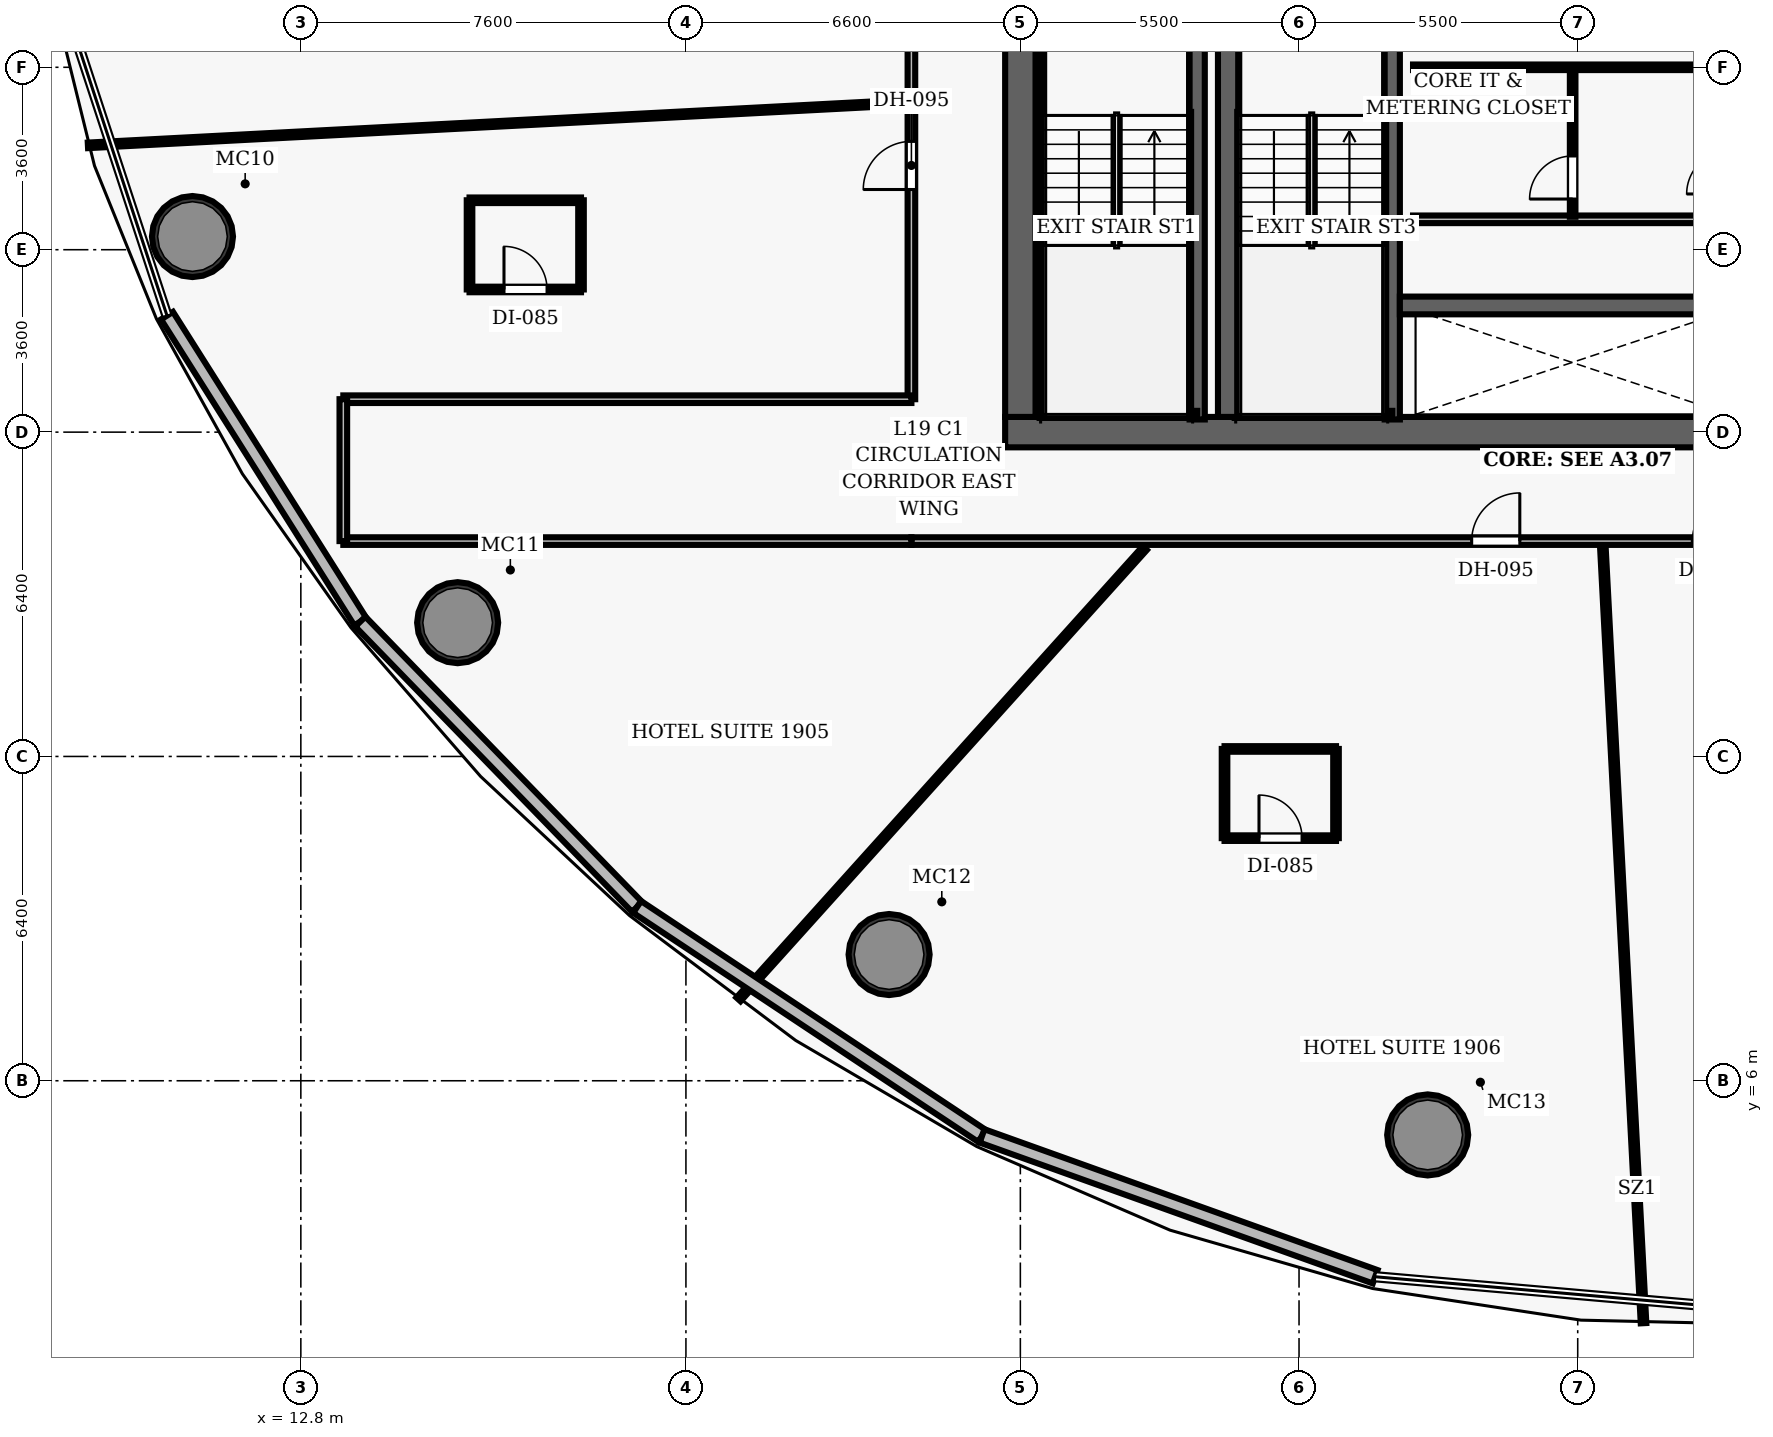
"""IFC4 building model, lengths in metres.
Left out: names, types, materials, properties, quantities, classifications, styles, units other than length and angle.
Written with IfcOpenShell. Run it as: python <this file> out.ifc"""

import sys

from ifc_helpers import new_model, si_unit, direction, frame, frame_2d, origin, origin_2d, place, context, subcontext, project, spatial, rectangle, hollow_circle, extrude, element, fill, save


model = new_model("IFC4")
c1 = context("Model", 3, precision=1e-05, world=origin(), true_north=direction((0.0, 1.0)))
c2 = subcontext(c1, "Body", "Model", "MODEL_VIEW")
j1 = project(units=[si_unit("LENGTHUNIT", "METRE"), si_unit("PLANEANGLEUNIT", "RADIAN")], contexts=[c1])
p1 = place(None, origin())
s1 = spatial("IfcSite", under=j1, at=p1, CompositionType="ELEMENT")
p2 = place(p1, origin())
s2 = spatial("IfcBuilding", under=s1, at=p2, CompositionType="ELEMENT")
p3 = place(p2, frame((0.0, 0.0, 83.4)))
s3 = spatial("IfcBuildingStorey", under=s2, at=p3, CompositionType="ELEMENT", Elevation=83.4)
p4 = place(p3, frame((26.7, 18.8, 0.0), z_axis=(0.0, 0.0, 1.0), x_axis=(1.0, 0.0, 0.0)))
e1 = element("IfcWall", 1, at=p4, inside=s3, PredefinedType="SHEAR", context=c2, shape_type="SweptSolid", body=[
    extrude(rectangle(XDim=22.6, YDim=0.6, at=frame_2d((11.3, 0.0))), origin(), (0.0, 0.0, 1.0), 3.5),
])
p5 = place(p4, frame((14.52, 0.0, 0.0)))
e2 = element("IfcOpeningElement", 2, at=p5, cuts=e1, PredefinedType="OPENING", context=c2, shape_type="SweptSolid", body=[
    extrude(rectangle(XDim=1.05, YDim=2.15, at=frame_2d((0.525, 1.075))), frame((0.0, 0.31, 0.0), z_axis=(0.0, -1.0, 0.0), x_axis=(1.0, 0.0, 0.0)), (0.0, 0.0, 1.0), 0.62),
])
p6 = place(p3, frame((27.0, 19.1, 0.0), z_axis=(0.0, 0.0, 1.0), x_axis=(0.0, 1.0, 0.0)))
e3 = element("IfcWall", 3, at=p6, inside=s3, PredefinedType="SHEAR", context=c2, shape_type="SweptSolid", body=[
    extrude(rectangle(XDim=13.8, YDim=0.6, at=frame_2d((6.9, 0.0))), origin(), (0.0, 0.0, 1.0), 3.5),
])
p7 = place(p6, frame((8.2, 0.0, 0.0)))
e4 = element("IfcOpeningElement", 4, at=p7, cuts=e3, PredefinedType="OPENING", context=c2, shape_type="SweptSolid", body=[
    extrude(rectangle(XDim=1.05, YDim=2.15, at=frame_2d((0.525, 1.075))), frame((0.0, 0.31, 0.0), z_axis=(0.0, -1.0, 0.0), x_axis=(1.0, 0.0, 0.0)), (0.0, 0.0, 1.0), 0.62),
])
p8 = place(p3, frame((31.1, 19.1, 0.0), z_axis=(0.0, 0.0, 1.0), x_axis=(0.0, 1.0, 0.0)))
e5 = element("IfcWall", 5, at=p8, inside=s3, PredefinedType="SHEAR", context=c2, shape_type="SweptSolid", body=[
    extrude(rectangle(XDim=13.8, YDim=0.4, at=frame_2d((6.9, 0.0))), origin(), (0.0, 0.0, 1.0), 3.5),
])
for number, where, z_axis, x_axis in (
    (6, (10.661, 22.66, 0.0), (0.0, 0.0, 1.0), (1.0, 0.0, 0.0)),
    (7, (15.895, 15.04, 0.0), (0.0, 0.0, 1.0), (1.0, 0.0, 0.0)),
    (8, (24.41, 8.491, 0.0), (0.0, 0.0, 1.0), (1.0, 0.0, 0.0)),
    (9, (35.039, 4.931, 0.0), (0.0, 0.0, 1.0), (1.0, 0.0, 0.0)),
):
    element("IfcColumn", number, at=place(p3, frame(where, z_axis=z_axis, x_axis=x_axis)), inside=s3, PredefinedType="COLUMN", context=c2, shape_type="SweptSolid", body=[
        extrude(hollow_circle(Radius=0.8, WallThickness=0.06, at=origin_2d()), origin(), (0.0, 0.0, 1.0), 3.5),
    ])
p9 = place(p3, frame((30.49, 19.05, 0.0), z_axis=(0.0, 0.0, 1.0), x_axis=(0.0, 1.0, 0.0)))
e10 = element("IfcWall", 10, at=p9, inside=s3, PredefinedType="SHEAR", context=c2, shape_type="SweptSolid", body=[
    extrude(rectangle(XDim=7.5, YDim=0.3, at=frame_2d((3.75, 0.0))), origin(), (0.0, 0.0, 1.0), 3.5),
])
p10 = place(p3, frame((27.395, 19.1, 0.0), z_axis=(0.0, 0.0, 1.0), x_axis=(0.0, 1.0, 0.0)))
e11 = element("IfcWall", 11, at=p10, inside=s3, PredefinedType="SHEAR", context=c2, shape_type="SweptSolid", body=[
    extrude(rectangle(XDim=7.45, YDim=0.12, at=frame_2d((3.725, 0.0))), origin(), (0.0, 0.0, 1.0), 3.5),
])
p11 = place(p3, frame((27.395, 19.16, 0.0), z_axis=(0.0, 0.0, 1.0), x_axis=(1.0, 0.0, 0.0)))
e12 = element("IfcWall", 12, at=p11, inside=s3, PredefinedType="SHEAR", context=c2, shape_type="SweptSolid", body=[
    extrude(rectangle(XDim=3.095, YDim=0.12, at=frame_2d((1.547, 0.0))), origin(), (0.0, 0.0, 1.0), 3.5),
])
p12 = place(p3, frame((34.34, 19.05, 0.0), z_axis=(0.0, 0.0, 1.0), x_axis=(0.0, 1.0, 0.0)))
e13 = element("IfcWall", 13, at=p12, inside=s3, PredefinedType="SHEAR", context=c2, shape_type="SweptSolid", body=[
    extrude(rectangle(XDim=7.5, YDim=0.3, at=frame_2d((3.75, 0.0))), origin(), (0.0, 0.0, 1.0), 3.5),
])
p13 = place(p3, frame((31.3, 19.16, 0.0), z_axis=(0.0, 0.0, 1.0), x_axis=(1.0, 0.0, 0.0)))
e14 = element("IfcWall", 14, at=p13, inside=s3, PredefinedType="SHEAR", context=c2, shape_type="SweptSolid", body=[
    extrude(rectangle(XDim=3.04, YDim=0.12, at=frame_2d((1.52, 0.0))), origin(), (0.0, 0.0, 1.0), 3.5),
])
p14 = place(p3, frame((34.49, 21.3, 0.0), z_axis=(0.0, 0.0, 1.0), x_axis=(1.0, 0.0, 0.0)))
e15 = element("IfcWall", 15, at=p14, inside=s3, PredefinedType="SHEAR", context=c2, shape_type="SweptSolid", body=[
    extrude(rectangle(XDim=6.68, YDim=0.35, at=frame_2d((3.34, 0.0))), origin(), (0.0, 0.0, 1.0), 2.6),
])
p15 = place(p3, frame((34.75, 23.0, 0.0), z_axis=(0.0, 0.0, 1.0), x_axis=(1.0, 0.0, 0.0)))
e16 = element("IfcWall", 16, at=p15, inside=s3, PredefinedType="PARTITIONING", context=c2, shape_type="SweptSolid", body=[
    extrude(rectangle(XDim=6.25, YDim=0.15, at=frame_2d((3.125, 0.0))), origin(), (0.0, 0.0, 1.0), 2.6),
])
p16 = place(p3, frame((34.75, 26.0, 0.0), z_axis=(0.0, 0.0, 1.0), x_axis=(1.0, 0.0, 0.0)))
e17 = element("IfcWall", 17, at=p16, inside=s3, PredefinedType="PARTITIONING", context=c2, shape_type="SweptSolid", body=[
    extrude(rectangle(XDim=6.25, YDim=0.11, at=frame_2d((3.125, 0.0))), origin(), (0.0, 0.0, 1.0), 2.6),
])
p17 = place(p3, frame((37.9, 23.05, 0.0), z_axis=(0.0, 0.0, 1.0), x_axis=(0.0, 1.0, 0.0)))
e18 = element("IfcWall", 18, at=p17, inside=s3, PredefinedType="PARTITIONING", context=c2, shape_type="SweptSolid", body=[
    extrude(rectangle(XDim=2.95, YDim=0.11, at=frame_2d((1.475, 0.0))), origin(), (0.0, 0.0, 1.0), 2.6),
])
p18 = place(p17, frame((0.35, 0.0, 0.0)))
e19 = element("IfcOpeningElement", 19, at=p18, cuts=e18, PredefinedType="OPENING", context=c2, shape_type="SweptSolid", body=[
    extrude(rectangle(XDim=0.85, YDim=2.1, at=frame_2d((0.425, 1.05))), frame((0.0, 0.065, 0.0), z_axis=(0.0, -1.0, 0.0), x_axis=(1.0, 0.0, 0.0)), (0.0, 0.0, 1.0), 0.13),
])
p19 = place(p3, frame((24.85, 16.65, 0.0), z_axis=(0.0, 0.0, 1.0), x_axis=(1.0, 0.0, 0.0)))
e20 = element("IfcWall", 20, at=p19, inside=s3, PredefinedType="PARTITIONING", context=c2, shape_type="SweptSolid", body=[
    extrude(rectangle(XDim=23.5, YDim=0.15, at=frame_2d((11.75, 0.0))), origin(), (0.0, 0.0, 1.0), 2.6),
])
p20 = place(p19, frame((11.057, 0.0, 0.0)))
e21 = element("IfcOpeningElement", 21, at=p20, cuts=e20, PredefinedType="OPENING", context=c2, shape_type="SweptSolid", body=[
    extrude(rectangle(XDim=0.95, YDim=2.15, at=frame_2d((0.475, 1.075))), frame((0.0, 0.085, 0.0), z_axis=(0.0, -1.0, 0.0), x_axis=(1.0, 0.0, 0.0)), (0.0, 0.0, 1.0), 0.17),
])
p21 = place(p19, frame((15.413, 0.0, 0.0)))
e22 = element("IfcOpeningElement", 22, at=p21, cuts=e20, PredefinedType="OPENING", context=c2, shape_type="SweptSolid", body=[
    extrude(rectangle(XDim=0.95, YDim=2.15, at=frame_2d((0.475, 1.075))), frame((0.0, 0.085, 0.0), z_axis=(0.0, -1.0, 0.0), x_axis=(1.0, 0.0, 0.0)), (0.0, 0.0, 1.0), 0.17),
])
p22 = place(p3, frame((24.85, 19.45, 0.0), z_axis=(0.0, 0.0, 1.0), x_axis=(0.0, 1.0, 0.0)))
e23 = element("IfcWall", 23, at=p22, inside=s3, PredefinedType="PARTITIONING", context=c2, shape_type="SweptSolid", body=[
    extrude(rectangle(XDim=15.9, YDim=0.15, at=frame_2d((7.95, 0.0))), origin(), (0.0, 0.0, 1.0), 2.6),
])
p23 = place(p22, frame((7.669, 0.0, 0.0)))
e24 = element("IfcOpeningElement", 24, at=p23, cuts=e23, PredefinedType="OPENING", context=c2, shape_type="SweptSolid", body=[
    extrude(rectangle(XDim=0.95, YDim=2.15, at=frame_2d((0.475, 1.075))), frame((0.0, 0.085, 0.0), z_axis=(0.0, -1.0, 0.0), x_axis=(1.0, 0.0, 0.0)), (0.0, 0.0, 1.0), 0.17),
])
p24 = place(p22, frame((4.138, 0.0, 0.0)))
e25 = element("IfcOpeningElement", 25, at=p24, cuts=e23, PredefinedType="OPENING", context=c2, shape_type="SweptSolid", body=[
    extrude(rectangle(XDim=0.95, YDim=2.15, at=frame_2d((0.475, 1.075))), frame((0.0, 0.085, 0.0), z_axis=(0.0, -1.0, 0.0), x_axis=(1.0, 0.0, 0.0)), (0.0, 0.0, 1.0), 0.17),
])
for number, where, z_axis, x_axis in (
    (26, (13.639, 19.45, 0.0), (0.0, 0.0, 1.0), (1.0, 0.0, 0.0)),
    (27, (13.639, 16.65, 0.0), (0.0, 0.0, 1.0), (1.0, 0.0, 0.0)),
):
    element("IfcWall", number, at=place(p3, frame(where, z_axis=z_axis, x_axis=x_axis)), inside=s3, PredefinedType="PARTITIONING", context=c2, shape_type="SweptSolid", body=[
        extrude(rectangle(XDim=11.211, YDim=0.15, at=frame_2d((5.606, 0.0))), origin(), (0.0, 0.0, 1.0), 2.6),
    ])
p25 = place(p3, frame((13.639, 16.65, 0.0), z_axis=(0.0, 0.0, 1.0), x_axis=(0.0, 1.0, 0.0)))
e28 = element("IfcWall", 28, at=p25, inside=s3, PredefinedType="PARTITIONING", context=c2, shape_type="SweptSolid", body=[
    extrude(rectangle(XDim=2.8, YDim=0.15, at=frame_2d((1.4, 0.0))), origin(), (0.0, 0.0, 1.0), 2.6),
])
p26 = place(p3, frame((24.71, 25.303, 0.0), z_axis=(0.0, 0.0, 1.0), x_axis=(-0.998629300498, -0.052340425941, 0.0)))
e29 = element("IfcWall", 29, at=p26, inside=s3, PredefinedType="PARTITIONING", context=c2, shape_type="SweptSolid", body=[
    extrude(rectangle(XDim=16.135, YDim=0.11, at=frame_2d((8.067, 0.0))), origin(), (0.0, 0.0, 1.0), 2.6),
])
p27 = place(p3, frame((29.455, 16.51, 0.0), z_axis=(0.0, 0.0, 1.0), x_axis=(-0.669127933847, -0.743147231809, 0.0)))
e30 = element("IfcWall", 30, at=p27, inside=s3, PredefinedType="PARTITIONING", context=c2, shape_type="SweptSolid", body=[
    extrude(rectangle(XDim=11.983, YDim=0.11, at=frame_2d((5.991, 0.0))), origin(), (0.0, 0.0, 1.0), 2.6),
])
p28 = place(p3, frame((38.497, 16.51, 0.0), z_axis=(0.0, 0.0, 1.0), x_axis=(0.052333766551, -0.998629649509, 0.0)))
e31 = element("IfcWall", 31, at=p28, inside=s3, PredefinedType="PARTITIONING", context=c2, shape_type="SweptSolid", body=[
    extrude(rectangle(XDim=15.315, YDim=0.11, at=frame_2d((7.658, 0.0))), origin(), (0.0, 0.0, 1.0), 2.6),
])
p29 = place(p3, frame((16.129, 21.615, 0.0), z_axis=(0.0, 0.0, 1.0), x_axis=(1.0, 0.0, 0.0)))
e32 = element("IfcWall", 32, at=p29, inside=s3, PredefinedType="PARTITIONING", context=c2, shape_type="SweptSolid", body=[
    extrude(rectangle(XDim=2.2, YDim=0.11, at=frame_2d((1.1, 0.0))), origin(), (0.0, 0.0, 1.0), 2.6),
])
p30 = place(p29, frame((0.68, 0.0, 0.0)))
e33 = element("IfcOpeningElement", 33, at=p30, cuts=e32, PredefinedType="OPENING", context=c2, shape_type="SweptSolid", body=[
    extrude(rectangle(XDim=0.85, YDim=2.1, at=frame_2d((0.425, 1.05))), frame((0.0, 0.065, 0.0), z_axis=(0.0, -1.0, 0.0), x_axis=(1.0, 0.0, 0.0)), (0.0, 0.0, 1.0), 0.13),
])
p31 = place(p3, frame((16.129, 23.375, 0.0), z_axis=(0.0, 0.0, 1.0), x_axis=(1.0, 0.0, 0.0)))
e34 = element("IfcWall", 34, at=p31, inside=s3, PredefinedType="PARTITIONING", context=c2, shape_type="SweptSolid", body=[
    extrude(rectangle(XDim=2.2, YDim=0.11, at=frame_2d((1.1, 0.0))), origin(), (0.0, 0.0, 1.0), 2.6),
])
for number, where, z_axis, x_axis in (
    (35, (16.129, 21.615, 0.0), (0.0, 0.0, 1.0), (0.0, 1.0, 0.0)),
    (36, (18.329, 21.615, 0.0), (0.0, 0.0, 1.0), (0.0, 1.0, 0.0)),
):
    element("IfcWall", number, at=place(p3, frame(where, z_axis=z_axis, x_axis=x_axis)), inside=s3, PredefinedType="PARTITIONING", context=c2, shape_type="SweptSolid", body=[
        extrude(rectangle(XDim=1.76, YDim=0.11, at=frame_2d((0.88, 0.0))), origin(), (0.0, 0.0, 1.0), 2.6),
    ])
p32 = place(p3, frame((31.03, 10.788, 0.0), z_axis=(0.0, 0.0, 1.0), x_axis=(1.0, 0.0, 0.0)))
e37 = element("IfcWall", 37, at=p32, inside=s3, PredefinedType="PARTITIONING", context=c2, shape_type="SweptSolid", body=[
    extrude(rectangle(XDim=2.2, YDim=0.11, at=frame_2d((1.1, 0.0))), origin(), (0.0, 0.0, 1.0), 2.6),
])
p33 = place(p32, frame((0.68, 0.0, 0.0)))
e38 = element("IfcOpeningElement", 38, at=p33, cuts=e37, PredefinedType="OPENING", context=c2, shape_type="SweptSolid", body=[
    extrude(rectangle(XDim=0.85, YDim=2.1, at=frame_2d((0.425, 1.05))), frame((0.0, 0.065, 0.0), z_axis=(0.0, -1.0, 0.0), x_axis=(1.0, 0.0, 0.0)), (0.0, 0.0, 1.0), 0.13),
])
p34 = place(p3, frame((31.03, 12.548, 0.0), z_axis=(0.0, 0.0, 1.0), x_axis=(1.0, 0.0, 0.0)))
e39 = element("IfcWall", 39, at=p34, inside=s3, PredefinedType="PARTITIONING", context=c2, shape_type="SweptSolid", body=[
    extrude(rectangle(XDim=2.2, YDim=0.11, at=frame_2d((1.1, 0.0))), origin(), (0.0, 0.0, 1.0), 2.6),
])
for number, where, z_axis, x_axis in (
    (40, (31.03, 10.788, 0.0), (0.0, 0.0, 1.0), (0.0, 1.0, 0.0)),
    (41, (33.23, 10.788, 0.0), (0.0, 0.0, 1.0), (0.0, 1.0, 0.0)),
):
    element("IfcWall", number, at=place(p3, frame(where, z_axis=z_axis, x_axis=x_axis)), inside=s3, PredefinedType="PARTITIONING", context=c2, shape_type="SweptSolid", body=[
        extrude(rectangle(XDim=1.76, YDim=0.11, at=frame_2d((0.88, 0.0))), origin(), (0.0, 0.0, 1.0), 2.6),
    ])
p35 = place(p3, frame((13.974, 15.061, 0.0), z_axis=(0.0, 0.0, 1.0), x_axis=(-0.534152439674, 0.845388177815, 0.0)))
e42 = element("IfcWall", 42, at=p35, inside=s3, PredefinedType="SOLIDWALL", context=c2, shape_type="SweptSolid", body=[
    extrude(rectangle(XDim=7.143, YDim=0.28, at=frame_2d((3.572, 0.0))), origin(), (0.0, 0.0, 1.0), 3.25),
])
p36 = place(p3, frame((19.436, 9.43, 0.0), z_axis=(0.0, 0.0, 1.0), x_axis=(-0.696319820972, 0.717731639906, 0.0)))
e43 = element("IfcWall", 43, at=p36, inside=s3, PredefinedType="SOLIDWALL", context=c2, shape_type="SweptSolid", body=[
    extrude(rectangle(XDim=7.845, YDim=0.28, at=frame_2d((3.922, 0.0))), origin(), (0.0, 0.0, 1.0), 3.25),
])
p37 = place(p3, frame((26.244, 4.911, 0.0), z_axis=(0.0, 0.0, 1.0), x_axis=(-0.833156470186, 0.553037337064, 0.0)))
e44 = element("IfcWall", 44, at=p37, inside=s3, PredefinedType="SOLIDWALL", context=c2, shape_type="SweptSolid", body=[
    extrude(rectangle(XDim=8.171, YDim=0.28, at=frame_2d((4.085, 0.0))), origin(), (0.0, 0.0, 1.0), 3.25),
])
p38 = place(p3, frame((34.003, 2.132, 0.0), z_axis=(0.0, 0.0, 1.0), x_axis=(-0.941431874185, 0.337203241782, 0.0)))
e45 = element("IfcWall", 45, at=p38, inside=s3, PredefinedType="SOLIDWALL", context=c2, shape_type="SweptSolid", body=[
    extrude(rectangle(XDim=8.241, YDim=0.28, at=frame_2d((4.121, 0.0))), origin(), (0.0, 0.0, 1.0), 3.25),
])
p39 = place(p18, origin())
e46 = element("IfcDoor", 46, at=p39, inside=s3, OperationType="SINGLE_SWING_LEFT", PredefinedType="DOOR", context=c2, shape_type="SweptSolid", body=[
    extrude(rectangle(XDim=0.85, YDim=2.1, at=frame_2d((0.425, 1.05))), frame((0.0, 0.025, 0.0), z_axis=(0.0, -1.0, 0.0), x_axis=(1.0, 0.0, 0.0)), (0.0, 0.0, 1.0), 0.05),
])
fill(e19, e46)
p40 = place(p24, origin())
e47 = element("IfcDoor", 47, at=p40, inside=s3, OperationType="SINGLE_SWING_LEFT", PredefinedType="DOOR", context=c2, shape_type="SweptSolid", body=[
    extrude(rectangle(XDim=0.95, YDim=2.15, at=frame_2d((0.475, 1.075))), frame((0.0, 0.025, 0.0), z_axis=(0.0, -1.0, 0.0), x_axis=(1.0, 0.0, 0.0)), (0.0, 0.0, 1.0), 0.05),
])
fill(e25, e47)
p41 = place(p30, origin())
e48 = element("IfcDoor", 48, at=p41, inside=s3, OperationType="SINGLE_SWING_LEFT", PredefinedType="DOOR", context=c2, shape_type="SweptSolid", body=[
    extrude(rectangle(XDim=0.85, YDim=2.1, at=frame_2d((0.425, 1.05))), frame((0.0, 0.025, 0.0), z_axis=(0.0, -1.0, 0.0), x_axis=(1.0, 0.0, 0.0)), (0.0, 0.0, 1.0), 0.05),
])
fill(e33, e48)
p42 = place(p20, origin())
e49 = element("IfcDoor", 49, at=p42, inside=s3, OperationType="SINGLE_SWING_RIGHT", PredefinedType="DOOR", context=c2, shape_type="SweptSolid", body=[
    extrude(rectangle(XDim=0.95, YDim=2.15, at=frame_2d((0.475, 1.075))), frame((0.0, 0.025, 0.0), z_axis=(0.0, -1.0, 0.0), x_axis=(1.0, 0.0, 0.0)), (0.0, 0.0, 1.0), 0.05),
])
fill(e21, e49)
p43 = place(p33, origin())
e50 = element("IfcDoor", 50, at=p43, inside=s3, OperationType="SINGLE_SWING_LEFT", PredefinedType="DOOR", context=c2, shape_type="SweptSolid", body=[
    extrude(rectangle(XDim=0.85, YDim=2.1, at=frame_2d((0.425, 1.05))), frame((0.0, 0.025, 0.0), z_axis=(0.0, -1.0, 0.0), x_axis=(1.0, 0.0, 0.0)), (0.0, 0.0, 1.0), 0.05),
])
fill(e38, e50)
p44 = place(p21, origin())
e51 = element("IfcDoor", 51, at=p44, inside=s3, OperationType="SINGLE_SWING_RIGHT", PredefinedType="DOOR", context=c2, shape_type="SweptSolid", body=[
    extrude(rectangle(XDim=0.95, YDim=2.15, at=frame_2d((0.475, 1.075))), frame((0.0, 0.025, 0.0), z_axis=(0.0, -1.0, 0.0), x_axis=(1.0, 0.0, 0.0)), (0.0, 0.0, 1.0), 0.05),
])
fill(e22, e51)
save(model, sys.argv[1])
